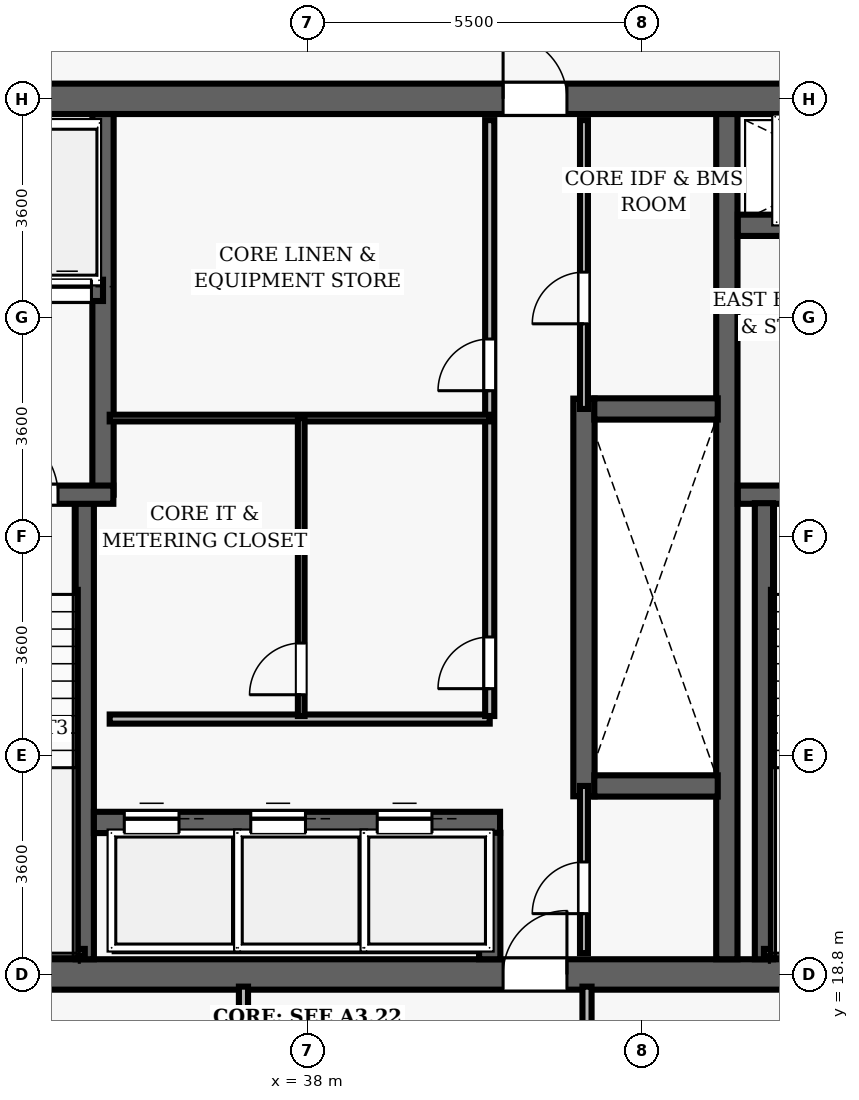
"""IFC4 building model, lengths in metres.
Left out: names, types, materials, properties, quantities, classifications, styles, units other than length and angle.
Written with IfcOpenShell. Run it as: python <this file> out.ifc"""

import sys

from ifc_helpers import new_model, si_unit, direction, frame, frame_2d, origin, place, context, subcontext, project, spatial, rectangle, extrude, element, fill, save


model = new_model("IFC4")
c1 = context("Model", 3, precision=1e-05, world=origin(), true_north=direction((0.0, 1.0)))
c2 = subcontext(c1, "Body", "Model", "MODEL_VIEW")
j1 = project(units=[si_unit("LENGTHUNIT", "METRE"), si_unit("PLANEANGLEUNIT", "RADIAN")], contexts=[c1])
p1 = place(None, origin())
s1 = spatial("IfcSite", under=j1, at=p1, CompositionType="ELEMENT")
p2 = place(p1, origin())
s2 = spatial("IfcBuilding", under=s1, at=p2, CompositionType="ELEMENT")
p3 = place(p2, frame((0.0, 0.0, 190.45)))
s3 = spatial("IfcBuildingStorey", under=s2, at=p3, CompositionType="ELEMENT", Elevation=190.45)
p4 = place(p3, frame((26.75, 18.8, 0.0), z_axis=(0.0, 0.0, 1.0), x_axis=(1.0, 0.0, 0.0)))
e1 = element("IfcWall", 1, at=p4, inside=s3, PredefinedType="SHEAR", context=c2, shape_type="SweptSolid", body=[
    extrude(rectangle(XDim=22.5, YDim=0.5, at=frame_2d((11.25, 0.0))), origin(), (0.0, 0.0, 1.0), 3.85),
])
p5 = place(p4, frame((14.47, 0.0, 0.0)))
e2 = element("IfcOpeningElement", 2, at=p5, cuts=e1, PredefinedType="OPENING", context=c2, shape_type="SweptSolid", body=[
    extrude(rectangle(XDim=1.05, YDim=2.15, at=frame_2d((0.525, 1.075))), frame((0.0, 0.26, 0.0), z_axis=(0.0, -1.0, 0.0), x_axis=(1.0, 0.0, 0.0)), (0.0, 0.0, 1.0), 0.52),
])
p6 = place(p3, frame((26.75, 33.2, 0.0), z_axis=(0.0, 0.0, 1.0), x_axis=(1.0, 0.0, 0.0)))
e3 = element("IfcWall", 3, at=p6, inside=s3, PredefinedType="SHEAR", context=c2, shape_type="SweptSolid", body=[
    extrude(rectangle(XDim=22.5, YDim=0.5, at=frame_2d((11.25, 0.0))), origin(), (0.0, 0.0, 1.0), 3.85),
])
p7 = place(p6, frame((4.57, 0.0, 0.0)))
e4 = element("IfcOpeningElement", 4, at=p7, cuts=e3, PredefinedType="OPENING", context=c2, shape_type="SweptSolid", body=[
    extrude(rectangle(XDim=1.05, YDim=2.15, at=frame_2d((0.525, 1.075))), frame((0.0, 0.26, 0.0), z_axis=(0.0, -1.0, 0.0), x_axis=(1.0, 0.0, 0.0)), (0.0, 0.0, 1.0), 0.52),
])
p8 = place(p6, frame((14.47, 0.0, 0.0)))
e5 = element("IfcOpeningElement", 5, at=p8, cuts=e3, PredefinedType="OPENING", context=c2, shape_type="SweptSolid", body=[
    extrude(rectangle(XDim=1.05, YDim=2.15, at=frame_2d((0.525, 1.075))), frame((0.0, 0.26, 0.0), z_axis=(0.0, -1.0, 0.0), x_axis=(1.0, 0.0, 0.0)), (0.0, 0.0, 1.0), 0.52),
])
p9 = place(p3, frame((44.9, 19.05, 0.0), z_axis=(0.0, 0.0, 1.0), x_axis=(0.0, 1.0, 0.0)))
e6 = element("IfcWall", 6, at=p9, inside=s3, PredefinedType="SHEAR", context=c2, shape_type="SweptSolid", body=[
    extrude(rectangle(XDim=13.9, YDim=0.35, at=frame_2d((6.95, 0.0))), origin(), (0.0, 0.0, 1.0), 3.85),
])
p10 = place(p3, frame((45.08, 26.69, 0.0), z_axis=(0.0, 0.0, 1.0), x_axis=(1.0, 0.0, 0.0)))
e7 = element("IfcWall", 7, at=p10, inside=s3, PredefinedType="SHEAR", context=c2, shape_type="SweptSolid", body=[
    extrude(rectangle(XDim=3.67, YDim=0.3, at=frame_2d((1.835, 0.0))), origin(), (0.0, 0.0, 1.0), 3.85),
])
p11 = place(p10, frame((1.05, 0.0, 0.0)))
e8 = element("IfcOpeningElement", 8, at=p11, cuts=e7, PredefinedType="OPENING", context=c2, shape_type="SweptSolid", body=[
    extrude(rectangle(XDim=1.1, YDim=2.15, at=frame_2d((0.55, 1.075))), frame((0.0, 0.16, 0.0), z_axis=(0.0, -1.0, 0.0), x_axis=(1.0, 0.0, 0.0)), (0.0, 0.0, 1.0), 0.32),
])
p12 = place(p3, frame((45.51, 19.05, 0.0), z_axis=(0.0, 0.0, 1.0), x_axis=(0.0, 1.0, 0.0)))
e9 = element("IfcWall", 9, at=p12, inside=s3, PredefinedType="SHEAR", context=c2, shape_type="SweptSolid", body=[
    extrude(rectangle(XDim=7.5, YDim=0.3, at=frame_2d((3.75, 0.0))), origin(), (0.0, 0.0, 1.0), 3.85),
])
p13 = place(p3, frame((45.51, 19.16, 0.0), z_axis=(0.0, 0.0, 1.0), x_axis=(1.0, 0.0, 0.0)))
e10 = element("IfcWall", 10, at=p13, inside=s3, PredefinedType="SHEAR", context=c2, shape_type="SweptSolid", body=[
    extrude(rectangle(XDim=3.095, YDim=0.12, at=frame_2d((1.547, 0.0))), origin(), (0.0, 0.0, 1.0), 3.85),
])
p14 = place(p3, frame((45.08, 31.12, 0.0), z_axis=(0.0, 0.0, 1.0), x_axis=(1.0, 0.0, 0.0)))
e11 = element("IfcWall", 11, at=p14, inside=s3, PredefinedType="SHEAR", context=c2, shape_type="SweptSolid", body=[
    extrude(rectangle(XDim=3.67, YDim=0.35, at=frame_2d((1.835, 0.0))), origin(), (0.0, 0.0, 1.0), 3.035),
])
p15 = place(p14, frame((1.25, 0.0, 0.0)))
e12 = element("IfcOpeningElement", 12, at=p15, cuts=e11, PredefinedType="OPENING", context=c2, shape_type="SweptSolid", body=[
    extrude(rectangle(XDim=1.1, YDim=2.15, at=frame_2d((0.55, 1.075))), frame((0.0, 0.185, 0.0), z_axis=(0.0, -1.0, 0.0), x_axis=(1.0, 0.0, 0.0)), (0.0, 0.0, 1.0), 0.37),
])
p16 = place(p3, frame((34.34, 19.05, 0.0), z_axis=(0.0, 0.0, 1.0), x_axis=(0.0, 1.0, 0.0)))
e13 = element("IfcWall", 13, at=p16, inside=s3, PredefinedType="SHEAR", context=c2, shape_type="SweptSolid", body=[
    extrude(rectangle(XDim=7.5, YDim=0.3, at=frame_2d((3.75, 0.0))), origin(), (0.0, 0.0, 1.0), 3.85),
])
p17 = place(p3, frame((34.64, 26.69, 0.0), z_axis=(0.0, 0.0, 1.0), x_axis=(0.0, 1.0, 0.0)))
e14 = element("IfcWall", 14, at=p17, inside=s3, PredefinedType="SHEAR", context=c2, shape_type="SweptSolid", body=[
    extrude(rectangle(XDim=6.26, YDim=0.35, at=frame_2d((3.13, 0.0))), origin(), (0.0, 0.0, 1.0), 3.85),
])
p18 = place(p3, frame((31.25, 26.69, 0.0), z_axis=(0.0, 0.0, 1.0), x_axis=(1.0, 0.0, 0.0)))
e15 = element("IfcWall", 15, at=p18, inside=s3, PredefinedType="SHEAR", context=c2, shape_type="SweptSolid", body=[
    extrude(rectangle(XDim=3.56, YDim=0.3, at=frame_2d((1.78, 0.0))), origin(), (0.0, 0.0, 1.0), 3.85),
])
p19 = place(p18, frame((1.55, 0.0, 0.0)))
e16 = element("IfcOpeningElement", 16, at=p19, cuts=e15, PredefinedType="OPENING", context=c2, shape_type="SweptSolid", body=[
    extrude(rectangle(XDim=1.1, YDim=2.15, at=frame_2d((0.55, 1.075))), frame((0.0, 0.16, 0.0), z_axis=(0.0, -1.0, 0.0), x_axis=(1.0, 0.0, 0.0)), (0.0, 0.0, 1.0), 0.32),
])
p20 = place(p3, frame((31.3, 19.16, 0.0), z_axis=(0.0, 0.0, 1.0), x_axis=(1.0, 0.0, 0.0)))
e17 = element("IfcWall", 17, at=p20, inside=s3, PredefinedType="SHEAR", context=c2, shape_type="SweptSolid", body=[
    extrude(rectangle(XDim=3.04, YDim=0.12, at=frame_2d((1.52, 0.0))), origin(), (0.0, 0.0, 1.0), 3.85),
])
p21 = place(p3, frame((32.23, 30.05, 0.0), z_axis=(0.0, 0.0, 1.0), x_axis=(1.0, 0.0, 0.0)))
e18 = element("IfcWall", 18, at=p21, inside=s3, PredefinedType="SHEAR", context=c2, shape_type="SweptSolid", body=[
    extrude(rectangle(XDim=2.41, YDim=0.35, at=frame_2d((1.205, 0.0))), origin(), (0.0, 0.0, 1.0), 3.035),
])
p22 = place(p21, frame((0.42, 0.0, 0.0)))
e19 = element("IfcOpeningElement", 19, at=p22, cuts=e18, PredefinedType="OPENING", context=c2, shape_type="SweptSolid", body=[
    extrude(rectangle(XDim=0.8, YDim=2.15, at=frame_2d((0.4, 1.075))), frame((0.0, 0.185, 0.0), z_axis=(0.0, -1.0, 0.0), x_axis=(1.0, 0.0, 0.0)), (0.0, 0.0, 1.0), 0.37),
])
p23 = place(p21, frame((1.42, 0.0, 0.0)))
e20 = element("IfcOpeningElement", 20, at=p23, cuts=e18, PredefinedType="OPENING", context=c2, shape_type="SweptSolid", body=[
    extrude(rectangle(XDim=0.8, YDim=2.15, at=frame_2d((0.4, 1.075))), frame((0.0, 0.185, 0.0), z_axis=(0.0, -1.0, 0.0), x_axis=(1.0, 0.0, 0.0)), (0.0, 0.0, 1.0), 0.37),
])
p24 = place(p3, frame((42.55, 21.73, 0.0), z_axis=(0.0, 0.0, 1.0), x_axis=(0.0, 1.0, 0.0)))
e21 = element("IfcWall", 21, at=p24, inside=s3, PredefinedType="SHEAR", context=c2, shape_type="SweptSolid", body=[
    extrude(rectangle(XDim=6.54, YDim=0.35, at=frame_2d((3.27, 0.0))), origin(), (0.0, 0.0, 1.0), 3.035),
])
for number, where, z_axis, x_axis in (
    (22, (42.72, 21.9, 0.0), (0.0, 0.0, 1.0), (1.0, 0.0, 0.0)),
    (23, (42.72, 28.1, 0.0), (0.0, 0.0, 1.0), (1.0, 0.0, 0.0)),
):
    element("IfcWall", number, at=place(p3, frame(where, z_axis=z_axis, x_axis=x_axis)), inside=s3, PredefinedType="SHEAR", context=c2, shape_type="SweptSolid", body=[
        extrude(rectangle(XDim=2.03, YDim=0.35, at=frame_2d((1.015, 0.0))), origin(), (0.0, 0.0, 1.0), 3.035),
    ])
p25 = place(p3, frame((34.49, 21.3, 0.0), z_axis=(0.0, 0.0, 1.0), x_axis=(1.0, 0.0, 0.0)))
e24 = element("IfcWall", 24, at=p25, inside=s3, PredefinedType="SHEAR", context=c2, shape_type="SweptSolid", body=[
    extrude(rectangle(XDim=6.68, YDim=0.35, at=frame_2d((3.34, 0.0))), origin(), (0.0, 0.0, 1.0), 3.035),
])
p26 = place(p25, frame((0.5, 0.0, 0.0)))
e25 = element("IfcOpeningElement", 25, at=p26, cuts=e24, PredefinedType="OPENING", context=c2, shape_type="SweptSolid", body=[
    extrude(rectangle(XDim=0.9, YDim=2.15, at=frame_2d((0.45, 1.075))), frame((0.0, 0.185, 0.0), z_axis=(0.0, -1.0, 0.0), x_axis=(1.0, 0.0, 0.0)), (0.0, 0.0, 1.0), 0.37),
])
p27 = place(p25, frame((2.58, 0.0, 0.0)))
e26 = element("IfcOpeningElement", 26, at=p27, cuts=e24, PredefinedType="OPENING", context=c2, shape_type="SweptSolid", body=[
    extrude(rectangle(XDim=0.9, YDim=2.15, at=frame_2d((0.45, 1.075))), frame((0.0, 0.185, 0.0), z_axis=(0.0, -1.0, 0.0), x_axis=(1.0, 0.0, 0.0)), (0.0, 0.0, 1.0), 0.37),
])
p28 = place(p25, frame((4.66, 0.0, 0.0)))
e27 = element("IfcOpeningElement", 27, at=p28, cuts=e24, PredefinedType="OPENING", context=c2, shape_type="SweptSolid", body=[
    extrude(rectangle(XDim=0.9, YDim=2.15, at=frame_2d((0.45, 1.075))), frame((0.0, 0.185, 0.0), z_axis=(0.0, -1.0, 0.0), x_axis=(1.0, 0.0, 0.0)), (0.0, 0.0, 1.0), 0.37),
])
p29 = place(p3, frame((41.0, 19.05, 0.0), z_axis=(0.0, 0.0, 1.0), x_axis=(0.0, 1.0, 0.0)))
e28 = element("IfcWall", 28, at=p29, inside=s3, PredefinedType="SHEAR", context=c2, shape_type="SweptSolid", body=[
    extrude(rectangle(XDim=2.08, YDim=0.35, at=frame_2d((1.04, 0.0))), origin(), (0.0, 0.0, 1.0), 3.035),
])
p30 = place(p3, frame((34.75, 23.0, 0.0), z_axis=(0.0, 0.0, 1.0), x_axis=(1.0, 0.0, 0.0)))
e29 = element("IfcWall", 29, at=p30, inside=s3, PredefinedType="PARTITIONING", context=c2, shape_type="SweptSolid", body=[
    extrude(rectangle(XDim=6.25, YDim=0.15, at=frame_2d((3.125, 0.0))), origin(), (0.0, 0.0, 1.0), 3.035),
])
p31 = place(p3, frame((41.0, 23.05, 0.0), z_axis=(0.0, 0.0, 1.0), x_axis=(0.0, 1.0, 0.0)))
e30 = element("IfcWall", 30, at=p31, inside=s3, PredefinedType="PARTITIONING", context=c2, shape_type="SweptSolid", body=[
    extrude(rectangle(XDim=9.8, YDim=0.15, at=frame_2d((4.9, 0.0))), origin(), (0.0, 0.0, 1.0), 3.035),
])
p32 = place(p31, frame((5.35, 0.0, 0.0)))
e31 = element("IfcOpeningElement", 31, at=p32, cuts=e30, PredefinedType="OPENING", context=c2, shape_type="SweptSolid", body=[
    extrude(rectangle(XDim=0.85, YDim=2.1, at=frame_2d((0.425, 1.05))), frame((0.0, 0.085, 0.0), z_axis=(0.0, -1.0, 0.0), x_axis=(1.0, 0.0, 0.0)), (0.0, 0.0, 1.0), 0.17),
])
p33 = place(p31, frame((0.45, 0.0, 0.0)))
e32 = element("IfcOpeningElement", 32, at=p33, cuts=e30, PredefinedType="OPENING", context=c2, shape_type="SweptSolid", body=[
    extrude(rectangle(XDim=0.85, YDim=2.1, at=frame_2d((0.425, 1.05))), frame((0.0, 0.085, 0.0), z_axis=(0.0, -1.0, 0.0), x_axis=(1.0, 0.0, 0.0)), (0.0, 0.0, 1.0), 0.17),
])
p34 = place(p3, frame((34.75, 27.95, 0.0), z_axis=(0.0, 0.0, 1.0), x_axis=(1.0, 0.0, 0.0)))
e33 = element("IfcWall", 33, at=p34, inside=s3, PredefinedType="PARTITIONING", context=c2, shape_type="SweptSolid", body=[
    extrude(rectangle(XDim=6.25, YDim=0.11, at=frame_2d((3.125, 0.0))), origin(), (0.0, 0.0, 1.0), 3.035),
])
p35 = place(p3, frame((37.9, 23.05, 0.0), z_axis=(0.0, 0.0, 1.0), x_axis=(0.0, 1.0, 0.0)))
e34 = element("IfcWall", 34, at=p35, inside=s3, PredefinedType="PARTITIONING", context=c2, shape_type="SweptSolid", body=[
    extrude(rectangle(XDim=4.9, YDim=0.11, at=frame_2d((2.45, 0.0))), origin(), (0.0, 0.0, 1.0), 3.035),
])
p36 = place(p35, frame((0.35, 0.0, 0.0)))
e35 = element("IfcOpeningElement", 35, at=p36, cuts=e34, PredefinedType="OPENING", context=c2, shape_type="SweptSolid", body=[
    extrude(rectangle(XDim=0.85, YDim=2.1, at=frame_2d((0.425, 1.05))), frame((0.0, 0.065, 0.0), z_axis=(0.0, -1.0, 0.0), x_axis=(1.0, 0.0, 0.0)), (0.0, 0.0, 1.0), 0.13),
])
p37 = place(p3, frame((42.55, 28.1, 0.0), z_axis=(0.0, 0.0, 1.0), x_axis=(0.0, 1.0, 0.0)))
e36 = element("IfcWall", 36, at=p37, inside=s3, PredefinedType="PARTITIONING", context=c2, shape_type="SweptSolid", body=[
    extrude(rectangle(XDim=4.75, YDim=0.13, at=frame_2d((2.375, 0.0))), origin(), (0.0, 0.0, 1.0), 3.035),
])
p38 = place(p37, frame((1.4, 0.0, 0.0)))
e37 = element("IfcOpeningElement", 37, at=p38, cuts=e36, PredefinedType="OPENING", context=c2, shape_type="SweptSolid", body=[
    extrude(rectangle(XDim=0.85, YDim=2.1, at=frame_2d((0.425, 1.05))), frame((0.0, 0.075, 0.0), z_axis=(0.0, -1.0, 0.0), x_axis=(1.0, 0.0, 0.0)), (0.0, 0.0, 1.0), 0.15),
])
p39 = place(p3, frame((42.55, 19.15, 0.0), z_axis=(0.0, 0.0, 1.0), x_axis=(0.0, 1.0, 0.0)))
e38 = element("IfcWall", 38, at=p39, inside=s3, PredefinedType="PARTITIONING", context=c2, shape_type="SweptSolid", body=[
    extrude(rectangle(XDim=2.75, YDim=0.13, at=frame_2d((1.375, 0.0))), origin(), (0.0, 0.0, 1.0), 3.035),
])
p40 = place(p39, frame((0.65, 0.0, 0.0)))
e39 = element("IfcOpeningElement", 39, at=p40, cuts=e38, PredefinedType="OPENING", context=c2, shape_type="SweptSolid", body=[
    extrude(rectangle(XDim=0.85, YDim=2.1, at=frame_2d((0.425, 1.05))), frame((0.0, 0.075, 0.0), z_axis=(0.0, -1.0, 0.0), x_axis=(1.0, 0.0, 0.0)), (0.0, 0.0, 1.0), 0.15),
])
p41 = place(p3, frame((36.95, 11.2, 0.0), z_axis=(0.0, 0.0, 1.0), x_axis=(0.0, 1.0, 0.0)))
e40 = element("IfcWall", 40, at=p41, inside=s3, PredefinedType="PARTITIONING", context=c2, shape_type="SweptSolid", body=[
    extrude(rectangle(XDim=7.4, YDim=0.15, at=frame_2d((3.7, 0.0))), origin(), (0.0, 0.0, 1.0), 3.035),
])
p42 = place(p41, frame((5.075, 0.0, 0.0)))
e41 = element("IfcOpeningElement", 41, at=p42, cuts=e40, PredefinedType="OPENING", context=c2, shape_type="SweptSolid", body=[
    extrude(rectangle(XDim=0.95, YDim=2.15, at=frame_2d((0.475, 1.075))), frame((0.0, 0.085, 0.0), z_axis=(0.0, -1.0, 0.0), x_axis=(1.0, 0.0, 0.0)), (0.0, 0.0, 1.0), 0.17),
])
p43 = place(p3, frame((42.6, 16.65, 0.0), z_axis=(0.0, 0.0, 1.0), x_axis=(0.0, 1.0, 0.0)))
e42 = element("IfcWall", 42, at=p43, inside=s3, PredefinedType="PARTITIONING", context=c2, shape_type="SweptSolid", body=[
    extrude(rectangle(XDim=1.95, YDim=0.15, at=frame_2d((0.975, 0.0))), origin(), (0.0, 0.0, 1.0), 3.035),
])
p44 = place(p19, origin())
e43 = element("IfcDoor", 43, at=p44, inside=s3, OperationType="SINGLE_SWING_LEFT", PredefinedType="DOOR", context=c2, shape_type="SweptSolid", body=[
    extrude(rectangle(XDim=1.1, YDim=2.15, at=frame_2d((0.55, 1.075))), frame((0.0, 0.025, 0.0), z_axis=(0.0, -1.0, 0.0), x_axis=(1.0, 0.0, 0.0)), (0.0, 0.0, 1.0), 0.05),
])
fill(e16, e43)
p45 = place(p8, origin())
e44 = element("IfcDoor", 44, at=p45, inside=s3, OperationType="SINGLE_SWING_LEFT", PredefinedType="DOOR", context=c2, shape_type="SweptSolid", body=[
    extrude(rectangle(XDim=1.05, YDim=2.15, at=frame_2d((0.525, 1.075))), frame((0.0, 0.025, 0.0), z_axis=(0.0, -1.0, 0.0), x_axis=(1.0, 0.0, 0.0)), (0.0, 0.0, 1.0), 0.05),
])
fill(e5, e44)
p46 = place(p5, origin())
e45 = element("IfcDoor", 45, at=p46, inside=s3, OperationType="SINGLE_SWING_RIGHT", PredefinedType="DOOR", context=c2, shape_type="SweptSolid", body=[
    extrude(rectangle(XDim=1.05, YDim=2.15, at=frame_2d((0.525, 1.075))), frame((0.0, 0.025, 0.0), z_axis=(0.0, -1.0, 0.0), x_axis=(1.0, 0.0, 0.0)), (0.0, 0.0, 1.0), 0.05),
])
fill(e2, e45)
p47 = place(p32, origin())
e46 = element("IfcDoor", 46, at=p47, inside=s3, OperationType="SINGLE_SWING_LEFT", PredefinedType="DOOR", context=c2, shape_type="SweptSolid", body=[
    extrude(rectangle(XDim=0.85, YDim=2.1, at=frame_2d((0.425, 1.05))), frame((0.0, 0.025, 0.0), z_axis=(0.0, -1.0, 0.0), x_axis=(1.0, 0.0, 0.0)), (0.0, 0.0, 1.0), 0.05),
])
fill(e31, e46)
p48 = place(p33, origin())
e47 = element("IfcDoor", 47, at=p48, inside=s3, OperationType="SINGLE_SWING_LEFT", PredefinedType="DOOR", context=c2, shape_type="SweptSolid", body=[
    extrude(rectangle(XDim=0.85, YDim=2.1, at=frame_2d((0.425, 1.05))), frame((0.0, 0.025, 0.0), z_axis=(0.0, -1.0, 0.0), x_axis=(1.0, 0.0, 0.0)), (0.0, 0.0, 1.0), 0.05),
])
fill(e32, e47)
p49 = place(p36, origin())
e48 = element("IfcDoor", 48, at=p49, inside=s3, OperationType="SINGLE_SWING_LEFT", PredefinedType="DOOR", context=c2, shape_type="SweptSolid", body=[
    extrude(rectangle(XDim=0.85, YDim=2.1, at=frame_2d((0.425, 1.05))), frame((0.0, 0.025, 0.0), z_axis=(0.0, -1.0, 0.0), x_axis=(1.0, 0.0, 0.0)), (0.0, 0.0, 1.0), 0.05),
])
fill(e35, e48)
p50 = place(p38, origin())
e49 = element("IfcDoor", 49, at=p50, inside=s3, OperationType="SINGLE_SWING_LEFT", PredefinedType="DOOR", context=c2, shape_type="SweptSolid", body=[
    extrude(rectangle(XDim=0.85, YDim=2.1, at=frame_2d((0.425, 1.05))), frame((0.0, 0.025, 0.0), z_axis=(0.0, -1.0, 0.0), x_axis=(1.0, 0.0, 0.0)), (0.0, 0.0, 1.0), 0.05),
])
fill(e37, e49)
p51 = place(p40, origin())
e50 = element("IfcDoor", 50, at=p51, inside=s3, OperationType="SINGLE_SWING_LEFT", PredefinedType="DOOR", context=c2, shape_type="SweptSolid", body=[
    extrude(rectangle(XDim=0.85, YDim=2.1, at=frame_2d((0.425, 1.05))), frame((0.0, 0.025, 0.0), z_axis=(0.0, -1.0, 0.0), x_axis=(1.0, 0.0, 0.0)), (0.0, 0.0, 1.0), 0.05),
])
fill(e39, e50)
p52 = place(p26, origin())
e51 = element("IfcDoor", 51, at=p52, inside=s3, OperationType="SLIDING_TO_LEFT", PredefinedType="DOOR", context=c2, shape_type="SweptSolid", body=[
    extrude(rectangle(XDim=0.9, YDim=2.15, at=frame_2d((0.45, 1.075))), frame((0.0, 0.025, 0.0), z_axis=(0.0, -1.0, 0.0), x_axis=(1.0, 0.0, 0.0)), (0.0, 0.0, 1.0), 0.05),
])
fill(e25, e51)
p53 = place(p27, origin())
e52 = element("IfcDoor", 52, at=p53, inside=s3, OperationType="SLIDING_TO_LEFT", PredefinedType="DOOR", context=c2, shape_type="SweptSolid", body=[
    extrude(rectangle(XDim=0.9, YDim=2.15, at=frame_2d((0.45, 1.075))), frame((0.0, 0.025, 0.0), z_axis=(0.0, -1.0, 0.0), x_axis=(1.0, 0.0, 0.0)), (0.0, 0.0, 1.0), 0.05),
])
fill(e26, e52)
p54 = place(p28, origin())
e53 = element("IfcDoor", 53, at=p54, inside=s3, OperationType="SLIDING_TO_LEFT", PredefinedType="DOOR", context=c2, shape_type="SweptSolid", body=[
    extrude(rectangle(XDim=0.9, YDim=2.15, at=frame_2d((0.45, 1.075))), frame((0.0, 0.025, 0.0), z_axis=(0.0, -1.0, 0.0), x_axis=(1.0, 0.0, 0.0)), (0.0, 0.0, 1.0), 0.05),
])
fill(e27, e53)
p55 = place(p23, origin())
e54 = element("IfcDoor", 54, at=p55, inside=s3, OperationType="SLIDING_TO_LEFT", PredefinedType="DOOR", context=c2, shape_type="SweptSolid", body=[
    extrude(rectangle(XDim=0.8, YDim=2.15, at=frame_2d((0.4, 1.075))), frame((0.0, 0.025, 0.0), z_axis=(0.0, -1.0, 0.0), x_axis=(1.0, 0.0, 0.0)), (0.0, 0.0, 1.0), 0.05),
])
fill(e20, e54)
save(model, sys.argv[1])
